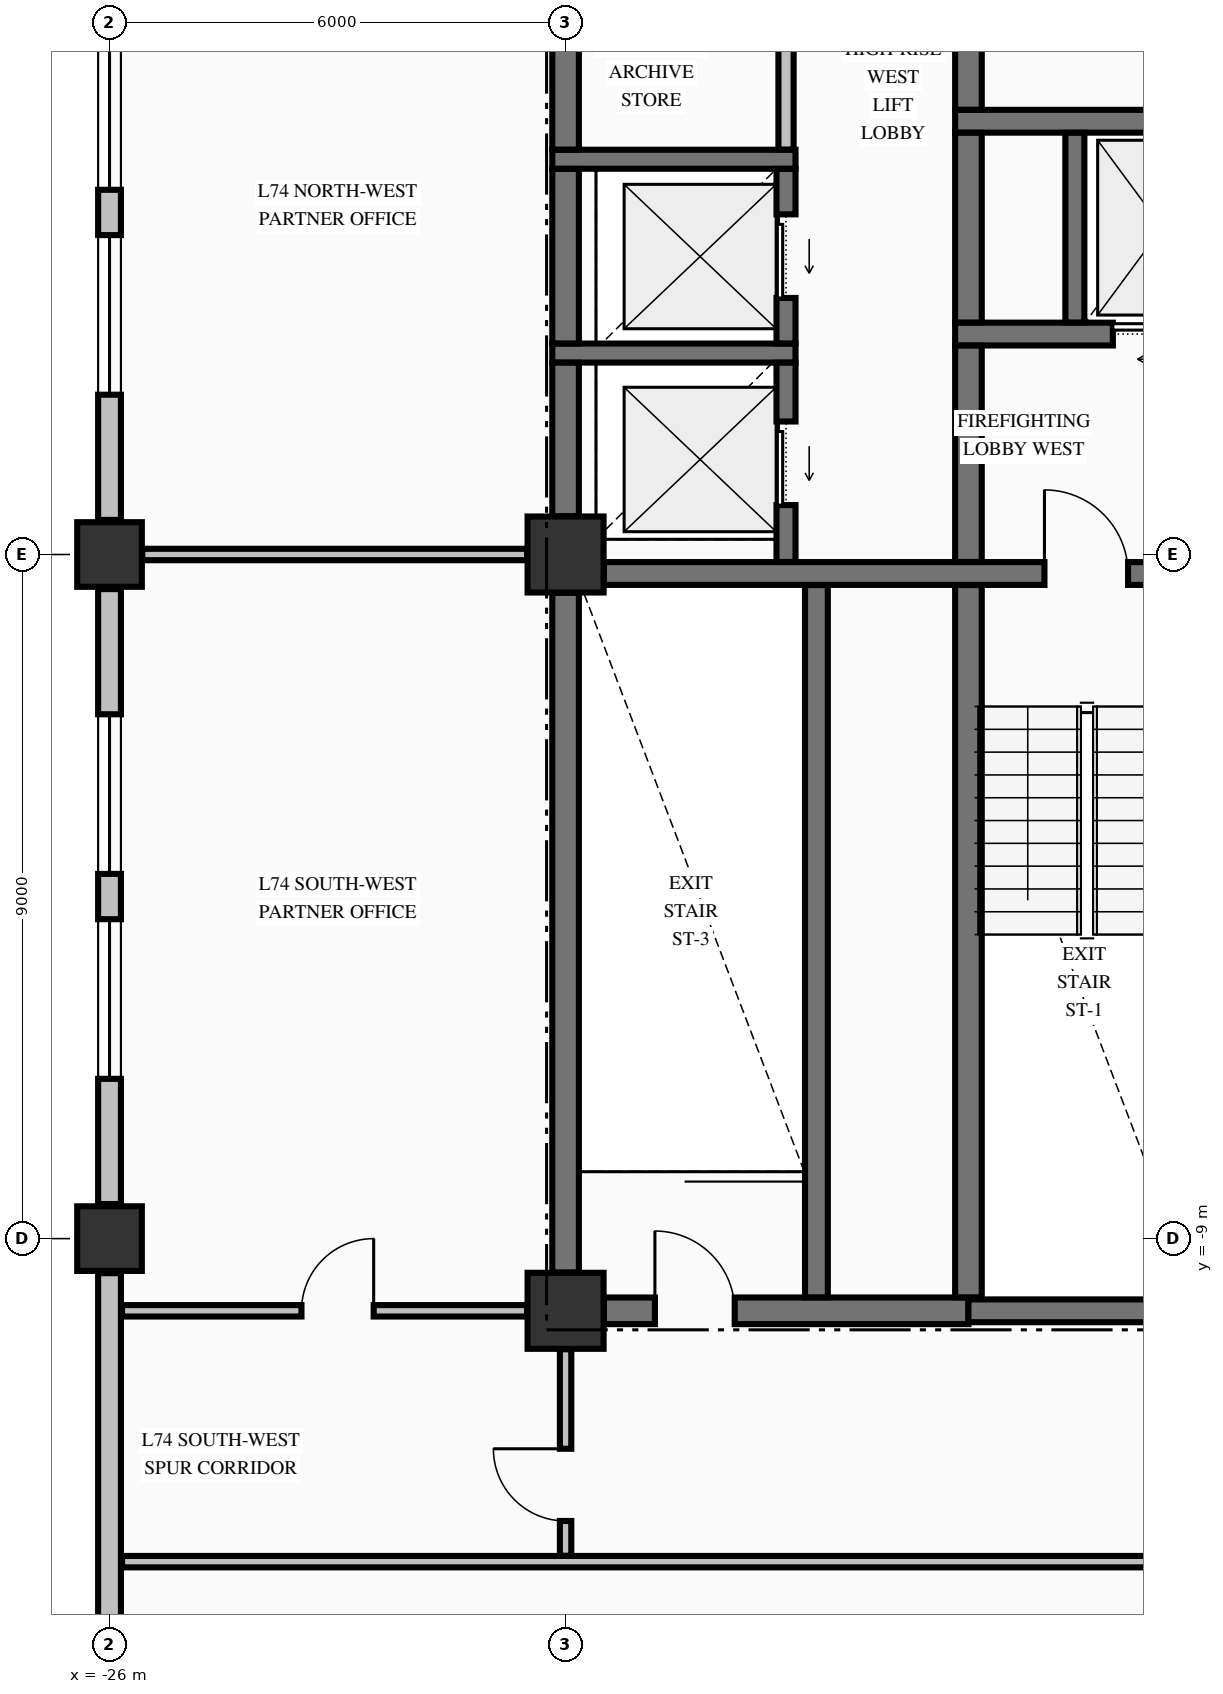
"""IFC4 building model, lengths in metres.
Left out: names, types, materials, properties, quantities, classifications, styles, units other than length and angle.
Written with IfcOpenShell. Run it as: python <this file> out.ifc"""

import sys

from ifc_helpers import new_model, si_unit, direction, frame, frame_2d, origin, origin_2d, place, context, subcontext, project, spatial, rectangle, extrude, element, fill, save


model = new_model("IFC4")
c1 = context("Model", 3, precision=1e-05, world=origin(), true_north=direction((0.0, 1.0)))
c2 = subcontext(c1, "Body", "Model", "MODEL_VIEW")
j1 = project(units=[si_unit("LENGTHUNIT", "METRE"), si_unit("PLANEANGLEUNIT", "RADIAN")], contexts=[c1])
p1 = place(None, origin())
s1 = spatial("IfcSite", under=j1, at=p1, CompositionType="ELEMENT")
p2 = place(p1, origin())
s2 = spatial("IfcBuilding", under=s1, at=p2, CompositionType="ELEMENT")
p3 = place(p2, frame((0.0, 0.0, 278.06)))
s3 = spatial("IfcBuildingStorey", under=s2, at=p3, CompositionType="ELEMENT", Elevation=278.06)
for number, where, z_axis, x_axis in (
    (1, (-26.0, -9.0, -0.425), (0.0, 0.0, 1.0), (1.0, 0.0, 0.0)),
    (2, (-26.0, 0.0, -0.425), (0.0, 0.0, 1.0), (1.0, 0.0, 0.0)),
):
    element("IfcColumn", number, at=place(p3, frame(where, z_axis=z_axis, x_axis=x_axis)), inside=s3, PredefinedType="COLUMN", context=c2, shape_type="SweptSolid", body=[
        extrude(rectangle(XDim=0.85, YDim=0.85, at=origin_2d()), origin(), (0.0, 0.0, 1.0), 3.84),
    ])
for number, where, z_axis, x_axis in (
    (3, (-20.0, -9.95, -0.425), (0.0, 0.0, 1.0), (1.0, 0.0, 0.0)),
    (4, (-20.0, 0.0, -0.425), (0.0, 0.0, 1.0), (1.0, 0.0, 0.0)),
):
    element("IfcColumn", number, at=place(p3, frame(where, z_axis=z_axis, x_axis=x_axis)), inside=s3, PredefinedType="COLUMN", context=c2, shape_type="SweptSolid", body=[
        extrude(rectangle(XDim=1.0, YDim=1.0, at=origin_2d()), origin(), (0.0, 0.0, 1.0), 3.84),
    ])
p4 = place(p3, frame((-26.0, -9.455, 0.0), z_axis=(0.0, 0.0, 1.0), x_axis=(0.0, -1.0, 0.0)))
e5 = element("IfcWall", 5, at=p4, inside=s3, PredefinedType="STANDARD", context=c2, shape_type="SweptSolid", body=[
    extrude(rectangle(XDim=8.09, YDim=0.3, at=frame_2d((4.045, 0.0))), origin(), (0.0, 0.0, 1.0), 1.607),
])
p5 = place(p3, frame((-26.0, -0.455, 0.0), z_axis=(0.0, 0.0, 1.0), x_axis=(0.0, -1.0, 0.0)))
e6 = element("IfcWall", 6, at=p5, inside=s3, PredefinedType="STANDARD", context=c2, shape_type="SweptSolid", body=[
    extrude(rectangle(XDim=8.09, YDim=0.3, at=frame_2d((4.045, 0.0))), origin(), (0.0, 0.0, 1.0), 2.807),
])
p6 = place(p5, frame((1.647, 0.0, 0.7)))
e7 = element("IfcOpeningElement", 7, at=p6, cuts=e6, PredefinedType="OPENING", context=c2, shape_type="SweptSolid", body=[
    extrude(rectangle(XDim=2.1, YDim=1.5, at=frame_2d((1.05, 0.75))), frame((0.0, 0.16, 0.0), z_axis=(0.0, -1.0, 0.0), x_axis=(1.0, 0.0, 0.0)), (0.0, 0.0, 1.0), 0.32),
])
p7 = place(p5, frame((4.343, 0.0, 0.7)))
e8 = element("IfcOpeningElement", 8, at=p7, cuts=e6, PredefinedType="OPENING", context=c2, shape_type="SweptSolid", body=[
    extrude(rectangle(XDim=2.1, YDim=1.5, at=frame_2d((1.05, 0.75))), frame((0.0, 0.16, 0.0), z_axis=(0.0, -1.0, 0.0), x_axis=(1.0, 0.0, 0.0)), (0.0, 0.0, 1.0), 0.32),
])
p8 = place(p3, frame((-26.0, 8.545, 0.0), z_axis=(0.0, 0.0, 1.0), x_axis=(0.0, -1.0, 0.0)))
e9 = element("IfcWall", 9, at=p8, inside=s3, PredefinedType="STANDARD", context=c2, shape_type="SweptSolid", body=[
    extrude(rectangle(XDim=8.09, YDim=0.3, at=frame_2d((4.045, 0.0))), origin(), (0.0, 0.0, 1.0), 2.807),
])
p9 = place(p8, frame((1.647, 0.0, 0.7)))
e10 = element("IfcOpeningElement", 10, at=p9, cuts=e9, PredefinedType="OPENING", context=c2, shape_type="SweptSolid", body=[
    extrude(rectangle(XDim=2.1, YDim=1.5, at=frame_2d((1.05, 0.75))), frame((0.0, 0.16, 0.0), z_axis=(0.0, -1.0, 0.0), x_axis=(1.0, 0.0, 0.0)), (0.0, 0.0, 1.0), 0.32),
])
p10 = place(p8, frame((4.343, 0.0, 0.7)))
e11 = element("IfcOpeningElement", 11, at=p10, cuts=e9, PredefinedType="OPENING", context=c2, shape_type="SweptSolid", body=[
    extrude(rectangle(XDim=2.1, YDim=1.5, at=frame_2d((1.05, 0.75))), frame((0.0, 0.16, 0.0), z_axis=(0.0, -1.0, 0.0), x_axis=(1.0, 0.0, 0.0)), (0.0, 0.0, 1.0), 0.32),
])
p11 = place(p3, frame((-19.496, -9.95, 0.0), z_axis=(0.0, 0.0, 1.0), x_axis=(1.0, 0.0, 0.0)))
e12 = element("IfcWall", 12, at=p11, inside=s3, PredefinedType="SHEAR", context=c2, shape_type="SweptSolid", body=[
    extrude(rectangle(XDim=4.796, YDim=0.35, at=frame_2d((2.398, 0.0))), origin(), (0.0, 0.0, 1.0), 3.415),
])
p12 = place(p11, frame((0.671, 0.0, 0.0)))
e13 = element("IfcOpeningElement", 13, at=p12, cuts=e12, PredefinedType="OPENING", context=c2, shape_type="SweptSolid", body=[
    extrude(rectangle(XDim=1.05, YDim=2.15, at=frame_2d((0.525, 1.075))), frame((0.0, 0.185, 0.0), z_axis=(0.0, -1.0, 0.0), x_axis=(1.0, 0.0, 0.0)), (0.0, 0.0, 1.0), 0.37),
])
p13 = place(p3, frame((-14.7, -9.95, 0.0), z_axis=(0.0, 0.0, 1.0), x_axis=(1.0, 0.0, 0.0)))
e14 = element("IfcWall", 14, at=p13, inside=s3, PredefinedType="SHEAR", context=c2, shape_type="SweptSolid", body=[
    extrude(rectangle(XDim=3.196, YDim=0.3, at=frame_2d((1.598, 0.0))), origin(), (0.0, 0.0, 1.0), 3.415),
])
p14 = place(p3, frame((-19.496, -0.25, 0.0), z_axis=(0.0, 0.0, 1.0), x_axis=(1.0, 0.0, 0.0)))
e15 = element("IfcWall", 15, at=p14, inside=s3, PredefinedType="SHEAR", context=c2, shape_type="SweptSolid", body=[
    extrude(rectangle(XDim=7.992, YDim=0.3, at=frame_2d((3.996, 0.0))), origin(), (0.0, 0.0, 1.0), 3.415),
])
p15 = place(p14, frame((5.796, 0.0, 0.0)))
e16 = element("IfcOpeningElement", 16, at=p15, cuts=e15, PredefinedType="OPENING", context=c2, shape_type="SweptSolid", body=[
    extrude(rectangle(XDim=1.1, YDim=2.15, at=frame_2d((0.55, 1.075))), frame((0.0, 0.16, 0.0), z_axis=(0.0, -1.0, 0.0), x_axis=(1.0, 0.0, 0.0)), (0.0, 0.0, 1.0), 0.32),
])
p16 = place(p3, frame((-20.175, 2.65, 0.0), z_axis=(0.0, 0.0, 1.0), x_axis=(1.0, 0.0, 0.0)))
e17 = element("IfcWall", 17, at=p16, inside=s3, PredefinedType="SOLIDWALL", context=c2, shape_type="SweptSolid", body=[
    extrude(rectangle(XDim=3.2, YDim=0.25, at=frame_2d((1.6, 0.0))), origin(), (0.0, 0.0, 1.0), 3.415),
])
p17 = place(p3, frame((-14.875, 2.9, 0.0), z_axis=(0.0, 0.0, 1.0), x_axis=(1.0, 0.0, 0.0)))
e18 = element("IfcWall", 18, at=p17, inside=s3, PredefinedType="SHEAR", context=c2, shape_type="SweptSolid", body=[
    extrude(rectangle(XDim=4.025, YDim=0.3, at=frame_2d((2.012, 0.0))), origin(), (0.0, 0.0, 1.0), 3.415),
])
p18 = place(p17, frame((2.075, 0.0, 0.0)))
e19 = element("IfcOpeningElement", 19, at=p18, cuts=e18, PredefinedType="OPENING", context=c2, shape_type="SweptSolid", body=[
    extrude(rectangle(XDim=1.1, YDim=2.2, at=frame_2d((0.55, 1.1))), frame((0.0, 0.16, 0.0), z_axis=(0.0, -1.0, 0.0), x_axis=(1.0, 0.0, 0.0)), (0.0, 0.0, 1.0), 0.32),
])
p19 = place(p3, frame((-20.175, 5.2, 0.0), z_axis=(0.0, 0.0, 1.0), x_axis=(1.0, 0.0, 0.0)))
e20 = element("IfcWall", 20, at=p19, inside=s3, PredefinedType="SOLIDWALL", context=c2, shape_type="SweptSolid", body=[
    extrude(rectangle(XDim=3.2, YDim=0.25, at=frame_2d((1.6, 0.0))), origin(), (0.0, 0.0, 1.0), 3.415),
])
p20 = place(p3, frame((-14.875, 5.7, 0.0), z_axis=(0.0, 0.0, 1.0), x_axis=(1.0, 0.0, 0.0)))
e21 = element("IfcWall", 21, at=p20, inside=s3, PredefinedType="SHEAR", context=c2, shape_type="SweptSolid", body=[
    extrude(rectangle(XDim=4.025, YDim=0.3, at=frame_2d((2.012, 0.0))), origin(), (0.0, 0.0, 1.0), 3.415),
])
p21 = place(p3, frame((-25.835, -13.25, 0.0), z_axis=(0.0, 0.0, 1.0), x_axis=(1.0, 0.0, 0.0)))
e22 = element("IfcWall", 22, at=p21, inside=s3, PredefinedType="PARTITIONING", context=c2, shape_type="SweptSolid", body=[
    extrude(rectangle(XDim=45.91, YDim=0.15, at=frame_2d((22.955, 0.0))), origin(), (0.0, 0.0, 1.0), 3.415),
])
p22 = place(p21, frame((26.685, 0.0, 0.0)))
e23 = element("IfcOpeningElement", 23, at=p22, cuts=e22, PredefinedType="OPENING", context=c2, shape_type="SweptSolid", body=[
    extrude(rectangle(XDim=1.1, YDim=2.15, at=frame_2d((0.55, 1.075))), frame((0.0, 0.085, 0.0), z_axis=(0.0, -1.0, 0.0), x_axis=(1.0, 0.0, 0.0)), (0.0, 0.0, 1.0), 0.17),
])
p23 = place(p21, frame((21.16, 0.0, 0.0)))
e24 = element("IfcOpeningElement", 24, at=p23, cuts=e22, PredefinedType="OPENING", context=c2, shape_type="SweptSolid", body=[
    extrude(rectangle(XDim=1.05, YDim=2.15, at=frame_2d((0.525, 1.075))), frame((0.0, 0.085, 0.0), z_axis=(0.0, -1.0, 0.0), x_axis=(1.0, 0.0, 0.0)), (0.0, 0.0, 1.0), 0.17),
])
p24 = place(p21, frame((34.31, 0.0, 0.0)))
e25 = element("IfcOpeningElement", 25, at=p24, cuts=e22, PredefinedType="OPENING", context=c2, shape_type="SweptSolid", body=[
    extrude(rectangle(XDim=1.05, YDim=2.15, at=frame_2d((0.525, 1.075))), frame((0.0, 0.085, 0.0), z_axis=(0.0, -1.0, 0.0), x_axis=(1.0, 0.0, 0.0)), (0.0, 0.0, 1.0), 0.17),
])
p25 = place(p3, frame((-25.835, -9.95, 0.0), z_axis=(0.0, 0.0, 1.0), x_axis=(1.0, 0.0, 0.0)))
e26 = element("IfcWall", 26, at=p25, inside=s3, PredefinedType="PARTITIONING", context=c2, shape_type="SweptSolid", body=[
    extrude(rectangle(XDim=5.329, YDim=0.15, at=frame_2d((2.665, 0.0))), origin(), (0.0, 0.0, 1.0), 3.415),
])
p26 = place(p25, frame((2.36, 0.0, 0.0)))
e27 = element("IfcOpeningElement", 27, at=p26, cuts=e26, PredefinedType="OPENING", context=c2, shape_type="SweptSolid", body=[
    extrude(rectangle(XDim=0.95, YDim=2.15, at=frame_2d((0.475, 1.075))), frame((0.0, 0.085, 0.0), z_axis=(0.0, -1.0, 0.0), x_axis=(1.0, 0.0, 0.0)), (0.0, 0.0, 1.0), 0.17),
])
p27 = place(p3, frame((-25.569, 0.0, 0.0), z_axis=(0.0, 0.0, 1.0), x_axis=(1.0, 0.0, 0.0)))
e28 = element("IfcWall", 28, at=p27, inside=s3, PredefinedType="PARTITIONING", context=c2, shape_type="SweptSolid", body=[
    extrude(rectangle(XDim=5.063, YDim=0.15, at=frame_2d((2.531, 0.0))), origin(), (0.0, 0.0, 1.0), 3.005),
])
p28 = place(p3, frame((-20.0, -9.446, 0.0), z_axis=(0.0, 0.0, 1.0), x_axis=(0.0, 1.0, 0.0)))
e29 = element("IfcWall", 29, at=p28, inside=s3, PredefinedType="SHEAR", context=c2, shape_type="SweptSolid", body=[
    extrude(rectangle(XDim=8.942, YDim=0.35, at=frame_2d((4.471, 0.0))), origin(), (0.0, 0.0, 1.0), 3.415),
])
p29 = place(p3, frame((-20.0, 0.504, 0.0), z_axis=(0.0, 0.0, 1.0), x_axis=(0.0, 1.0, 0.0)))
e30 = element("IfcWall", 30, at=p29, inside=s3, PredefinedType="SHEAR", context=c2, shape_type="SweptSolid", body=[
    extrude(rectangle(XDim=2.019, YDim=0.35, at=frame_2d((1.01, 0.0))), origin(), (0.0, 0.0, 1.0), 3.415),
])
p30 = place(p3, frame((-20.0, 2.777, 0.0), z_axis=(0.0, 0.0, 1.0), x_axis=(0.0, 1.0, 0.0)))
e31 = element("IfcWall", 31, at=p30, inside=s3, PredefinedType="SHEAR", context=c2, shape_type="SweptSolid", body=[
    extrude(rectangle(XDim=2.296, YDim=0.35, at=frame_2d((1.148, 0.0))), origin(), (0.0, 0.0, 1.0), 3.415),
])
p31 = place(p3, frame((-20.0, 5.327, 0.0), z_axis=(0.0, 0.0, 1.0), x_axis=(0.0, 1.0, 0.0)))
e32 = element("IfcWall", 32, at=p31, inside=s3, PredefinedType="SHEAR", context=c2, shape_type="SweptSolid", body=[
    extrude(rectangle(XDim=4.669, YDim=0.35, at=frame_2d((2.334, 0.0))), origin(), (0.0, 0.0, 1.0), 3.415),
])
p32 = place(p3, frame((-17.1, -0.098, 0.0), z_axis=(0.0, 0.0, 1.0), x_axis=(0.0, 1.0, 0.0)))
e33 = element("IfcWall", 33, at=p32, inside=s3, PredefinedType="SOLIDWALL", context=c2, shape_type="SweptSolid", body=[
    extrude(rectangle(XDim=2.621, YDim=0.25, at=frame_2d((1.311, 0.0))), origin(), (0.0, 0.0, 1.0), 3.415),
])
p33 = place(p32, frame((0.748, 0.0, 0.0)))
e34 = element("IfcOpeningElement", 34, at=p33, cuts=e33, PredefinedType="OPENING", context=c2, shape_type="SweptSolid", body=[
    extrude(rectangle(XDim=1.1, YDim=2.2, at=frame_2d((0.55, 1.1))), frame((0.0, 0.135, 0.0), z_axis=(0.0, -1.0, 0.0), x_axis=(1.0, 0.0, 0.0)), (0.0, 0.0, 1.0), 0.27),
])
p34 = place(p3, frame((-17.1, 2.777, 0.0), z_axis=(0.0, 0.0, 1.0), x_axis=(0.0, 1.0, 0.0)))
e35 = element("IfcWall", 35, at=p34, inside=s3, PredefinedType="SOLIDWALL", context=c2, shape_type="SweptSolid", body=[
    extrude(rectangle(XDim=2.296, YDim=0.25, at=frame_2d((1.148, 0.0))), origin(), (0.0, 0.0, 1.0), 3.415),
])
p35 = place(p34, frame((0.598, 0.0, 0.0)))
e36 = element("IfcOpeningElement", 36, at=p35, cuts=e35, PredefinedType="OPENING", context=c2, shape_type="SweptSolid", body=[
    extrude(rectangle(XDim=1.1, YDim=2.2, at=frame_2d((0.55, 1.1))), frame((0.0, 0.135, 0.0), z_axis=(0.0, -1.0, 0.0), x_axis=(1.0, 0.0, 0.0)), (0.0, 0.0, 1.0), 0.27),
])
p36 = place(p3, frame((-16.7, -9.773, 0.0), z_axis=(0.0, 0.0, 1.0), x_axis=(0.0, 1.0, 0.0)))
e37 = element("IfcWall", 37, at=p36, inside=s3, PredefinedType="SHEAR", context=c2, shape_type="SweptSolid", body=[
    extrude(rectangle(XDim=9.371, YDim=0.3, at=frame_2d((4.686, 0.0))), origin(), (0.0, 0.0, 1.0), 3.415),
])
p37 = place(p3, frame((-14.7, -9.773, 0.0), z_axis=(0.0, 0.0, 1.0), x_axis=(0.0, 1.0, 0.0)))
e38 = element("IfcWall", 38, at=p37, inside=s3, PredefinedType="SHEAR", context=c2, shape_type="SweptSolid", body=[
    extrude(rectangle(XDim=9.371, YDim=0.35, at=frame_2d((4.686, 0.0))), origin(), (0.0, 0.0, 1.0), 3.415),
])
p38 = place(p3, frame((-14.7, -0.098, 0.0), z_axis=(0.0, 0.0, 1.0), x_axis=(0.0, 1.0, 0.0)))
e39 = element("IfcWall", 39, at=p38, inside=s3, PredefinedType="SHEAR", context=c2, shape_type="SweptSolid", body=[
    extrude(rectangle(XDim=2.846, YDim=0.35, at=frame_2d((1.423, 0.0))), origin(), (0.0, 0.0, 1.0), 3.415),
])
p39 = place(p3, frame((-14.7, 3.052, 0.0), z_axis=(0.0, 0.0, 1.0), x_axis=(0.0, 1.0, 0.0)))
e40 = element("IfcWall", 40, at=p39, inside=s3, PredefinedType="SHEAR", context=c2, shape_type="SweptSolid", body=[
    extrude(rectangle(XDim=2.496, YDim=0.35, at=frame_2d((1.248, 0.0))), origin(), (0.0, 0.0, 1.0), 3.415),
])
p40 = place(p3, frame((-14.7, 5.852, 0.0), z_axis=(0.0, 0.0, 1.0), x_axis=(0.0, 1.0, 0.0)))
e41 = element("IfcWall", 41, at=p40, inside=s3, PredefinedType="SHEAR", context=c2, shape_type="SweptSolid", body=[
    extrude(rectangle(XDim=4.471, YDim=0.35, at=frame_2d((2.235, 0.0))), origin(), (0.0, 0.0, 1.0), 3.415),
])
p41 = place(p3, frame((-13.3, 3.052, 0.0), z_axis=(0.0, 0.0, 1.0), x_axis=(0.0, 1.0, 0.0)))
e42 = element("IfcWall", 42, at=p41, inside=s3, PredefinedType="SOLIDWALL", context=c2, shape_type="SweptSolid", body=[
    extrude(rectangle(XDim=2.496, YDim=0.25, at=frame_2d((1.248, 0.0))), origin(), (0.0, 0.0, 1.0), 3.415),
])
p42 = place(p3, frame((-20.0, -13.172, 0.0), z_axis=(0.0, 0.0, 1.0), x_axis=(0.0, 1.0, 0.0)))
e43 = element("IfcWall", 43, at=p42, inside=s3, PredefinedType="PARTITIONING", context=c2, shape_type="SweptSolid", body=[
    extrude(rectangle(XDim=2.716, YDim=0.15, at=frame_2d((1.358, 0.0))), origin(), (0.0, 0.0, 1.0), 3.415),
])
p43 = place(p42, frame((0.457, 0.0, 0.0)))
e44 = element("IfcOpeningElement", 44, at=p43, cuts=e43, PredefinedType="OPENING", context=c2, shape_type="SweptSolid", body=[
    extrude(rectangle(XDim=0.95, YDim=2.15, at=frame_2d((0.475, 1.075))), frame((0.0, 0.085, 0.0), z_axis=(0.0, -1.0, 0.0), x_axis=(1.0, 0.0, 0.0)), (0.0, 0.0, 1.0), 0.17),
])
p44 = place(p3, frame((-17.1, 5.328, 0.0), z_axis=(0.0, 0.0, 1.0), x_axis=(0.0, 1.0, 0.0)))
e45 = element("IfcWall", 45, at=p44, inside=s3, PredefinedType="PARTITIONING", context=c2, shape_type="SweptSolid", body=[
    extrude(rectangle(XDim=4.994, YDim=0.2, at=frame_2d((2.497, 0.0))), origin(), (0.0, 0.0, 1.0), 3.415),
])
p45 = place(p44, frame((2.072, 0.0, 0.0)))
e46 = element("IfcOpeningElement", 46, at=p45, cuts=e45, PredefinedType="OPENING", context=c2, shape_type="SweptSolid", body=[
    extrude(rectangle(XDim=0.9, YDim=2.15, at=frame_2d((0.45, 1.075))), frame((0.0, 0.11, 0.0), z_axis=(0.0, -1.0, 0.0), x_axis=(1.0, 0.0, 0.0)), (0.0, 0.0, 1.0), 0.22),
])
p46 = place(p6, origin())
e47 = element("IfcWindow", 47, at=p46, inside=s3, PartitioningType="SINGLE_PANEL", PredefinedType="WINDOW", context=c2, shape_type="SweptSolid", body=[
    extrude(rectangle(XDim=2.1, YDim=1.5, at=frame_2d((1.05, 0.75))), frame((0.0, 0.03, 0.0), z_axis=(0.0, -1.0, 0.0), x_axis=(1.0, 0.0, 0.0)), (0.0, 0.0, 1.0), 0.06),
])
fill(e7, e47)
p47 = place(p7, origin())
e48 = element("IfcWindow", 48, at=p47, inside=s3, PartitioningType="SINGLE_PANEL", PredefinedType="WINDOW", context=c2, shape_type="SweptSolid", body=[
    extrude(rectangle(XDim=2.1, YDim=1.5, at=frame_2d((1.05, 0.75))), frame((0.0, 0.03, 0.0), z_axis=(0.0, -1.0, 0.0), x_axis=(1.0, 0.0, 0.0)), (0.0, 0.0, 1.0), 0.06),
])
fill(e8, e48)
p48 = place(p9, origin())
e49 = element("IfcWindow", 49, at=p48, inside=s3, PartitioningType="SINGLE_PANEL", PredefinedType="WINDOW", context=c2, shape_type="SweptSolid", body=[
    extrude(rectangle(XDim=2.1, YDim=1.5, at=frame_2d((1.05, 0.75))), frame((0.0, 0.03, 0.0), z_axis=(0.0, -1.0, 0.0), x_axis=(1.0, 0.0, 0.0)), (0.0, 0.0, 1.0), 0.06),
])
fill(e10, e49)
p49 = place(p10, origin())
e50 = element("IfcWindow", 50, at=p49, inside=s3, PartitioningType="SINGLE_PANEL", PredefinedType="WINDOW", context=c2, shape_type="SweptSolid", body=[
    extrude(rectangle(XDim=2.1, YDim=1.5, at=frame_2d((1.05, 0.75))), frame((0.0, 0.03, 0.0), z_axis=(0.0, -1.0, 0.0), x_axis=(1.0, 0.0, 0.0)), (0.0, 0.0, 1.0), 0.06),
])
fill(e11, e50)
p50 = place(p15, origin())
e51 = element("IfcDoor", 51, at=p50, inside=s3, OperationType="SINGLE_SWING_LEFT", PredefinedType="DOOR", context=c2, shape_type="SweptSolid", body=[
    extrude(rectangle(XDim=1.1, YDim=2.15, at=frame_2d((0.55, 1.075))), frame((0.0, 0.025, 0.0), z_axis=(0.0, -1.0, 0.0), x_axis=(1.0, 0.0, 0.0)), (0.0, 0.0, 1.0), 0.05),
])
fill(e16, e51)
p51 = place(p18, origin())
e52 = element("IfcDoor", 52, at=p51, inside=s3, OperationType="SLIDING_TO_LEFT", PredefinedType="DOOR", context=c2, shape_type="SweptSolid", body=[
    extrude(rectangle(XDim=1.1, YDim=2.2, at=frame_2d((0.55, 1.1))), frame((0.0, 0.025, 0.0), z_axis=(0.0, -1.0, 0.0), x_axis=(1.0, 0.0, 0.0)), (0.0, 0.0, 1.0), 0.05),
])
fill(e19, e52)
p52 = place(p12, origin())
e53 = element("IfcDoor", 53, at=p52, inside=s3, OperationType="SINGLE_SWING_LEFT", PredefinedType="DOOR", context=c2, shape_type="SweptSolid", body=[
    extrude(rectangle(XDim=1.05, YDim=2.15, at=frame_2d((0.525, 1.075))), frame((0.0, 0.025, 0.0), z_axis=(0.0, -1.0, 0.0), x_axis=(1.0, 0.0, 0.0)), (0.0, 0.0, 1.0), 0.05),
])
fill(e13, e53)
p53 = place(p33, origin())
e54 = element("IfcDoor", 54, at=p53, inside=s3, OperationType="SLIDING_TO_LEFT", PredefinedType="DOOR", context=c2, shape_type="SweptSolid", body=[
    extrude(rectangle(XDim=1.1, YDim=2.2, at=frame_2d((0.55, 1.1))), frame((0.0, 0.025, 0.0), z_axis=(0.0, -1.0, 0.0), x_axis=(1.0, 0.0, 0.0)), (0.0, 0.0, 1.0), 0.05),
])
fill(e34, e54)
p54 = place(p35, origin())
e55 = element("IfcDoor", 55, at=p54, inside=s3, OperationType="SLIDING_TO_LEFT", PredefinedType="DOOR", context=c2, shape_type="SweptSolid", body=[
    extrude(rectangle(XDim=1.1, YDim=2.2, at=frame_2d((0.55, 1.1))), frame((0.0, 0.025, 0.0), z_axis=(0.0, -1.0, 0.0), x_axis=(1.0, 0.0, 0.0)), (0.0, 0.0, 1.0), 0.05),
])
fill(e36, e55)
p55 = place(p43, origin())
e56 = element("IfcDoor", 56, at=p55, inside=s3, OperationType="SINGLE_SWING_RIGHT", PredefinedType="DOOR", context=c2, shape_type="SweptSolid", body=[
    extrude(rectangle(XDim=0.95, YDim=2.15, at=frame_2d((0.475, 1.075))), frame((0.0, 0.025, 0.0), z_axis=(0.0, -1.0, 0.0), x_axis=(1.0, 0.0, 0.0)), (0.0, 0.0, 1.0), 0.05),
])
fill(e44, e56)
p56 = place(p26, origin())
e57 = element("IfcDoor", 57, at=p56, inside=s3, OperationType="SINGLE_SWING_RIGHT", PredefinedType="DOOR", context=c2, shape_type="SweptSolid", body=[
    extrude(rectangle(XDim=0.95, YDim=2.15, at=frame_2d((0.475, 1.075))), frame((0.0, 0.025, 0.0), z_axis=(0.0, -1.0, 0.0), x_axis=(1.0, 0.0, 0.0)), (0.0, 0.0, 1.0), 0.05),
])
fill(e27, e57)
save(model, sys.argv[1])
